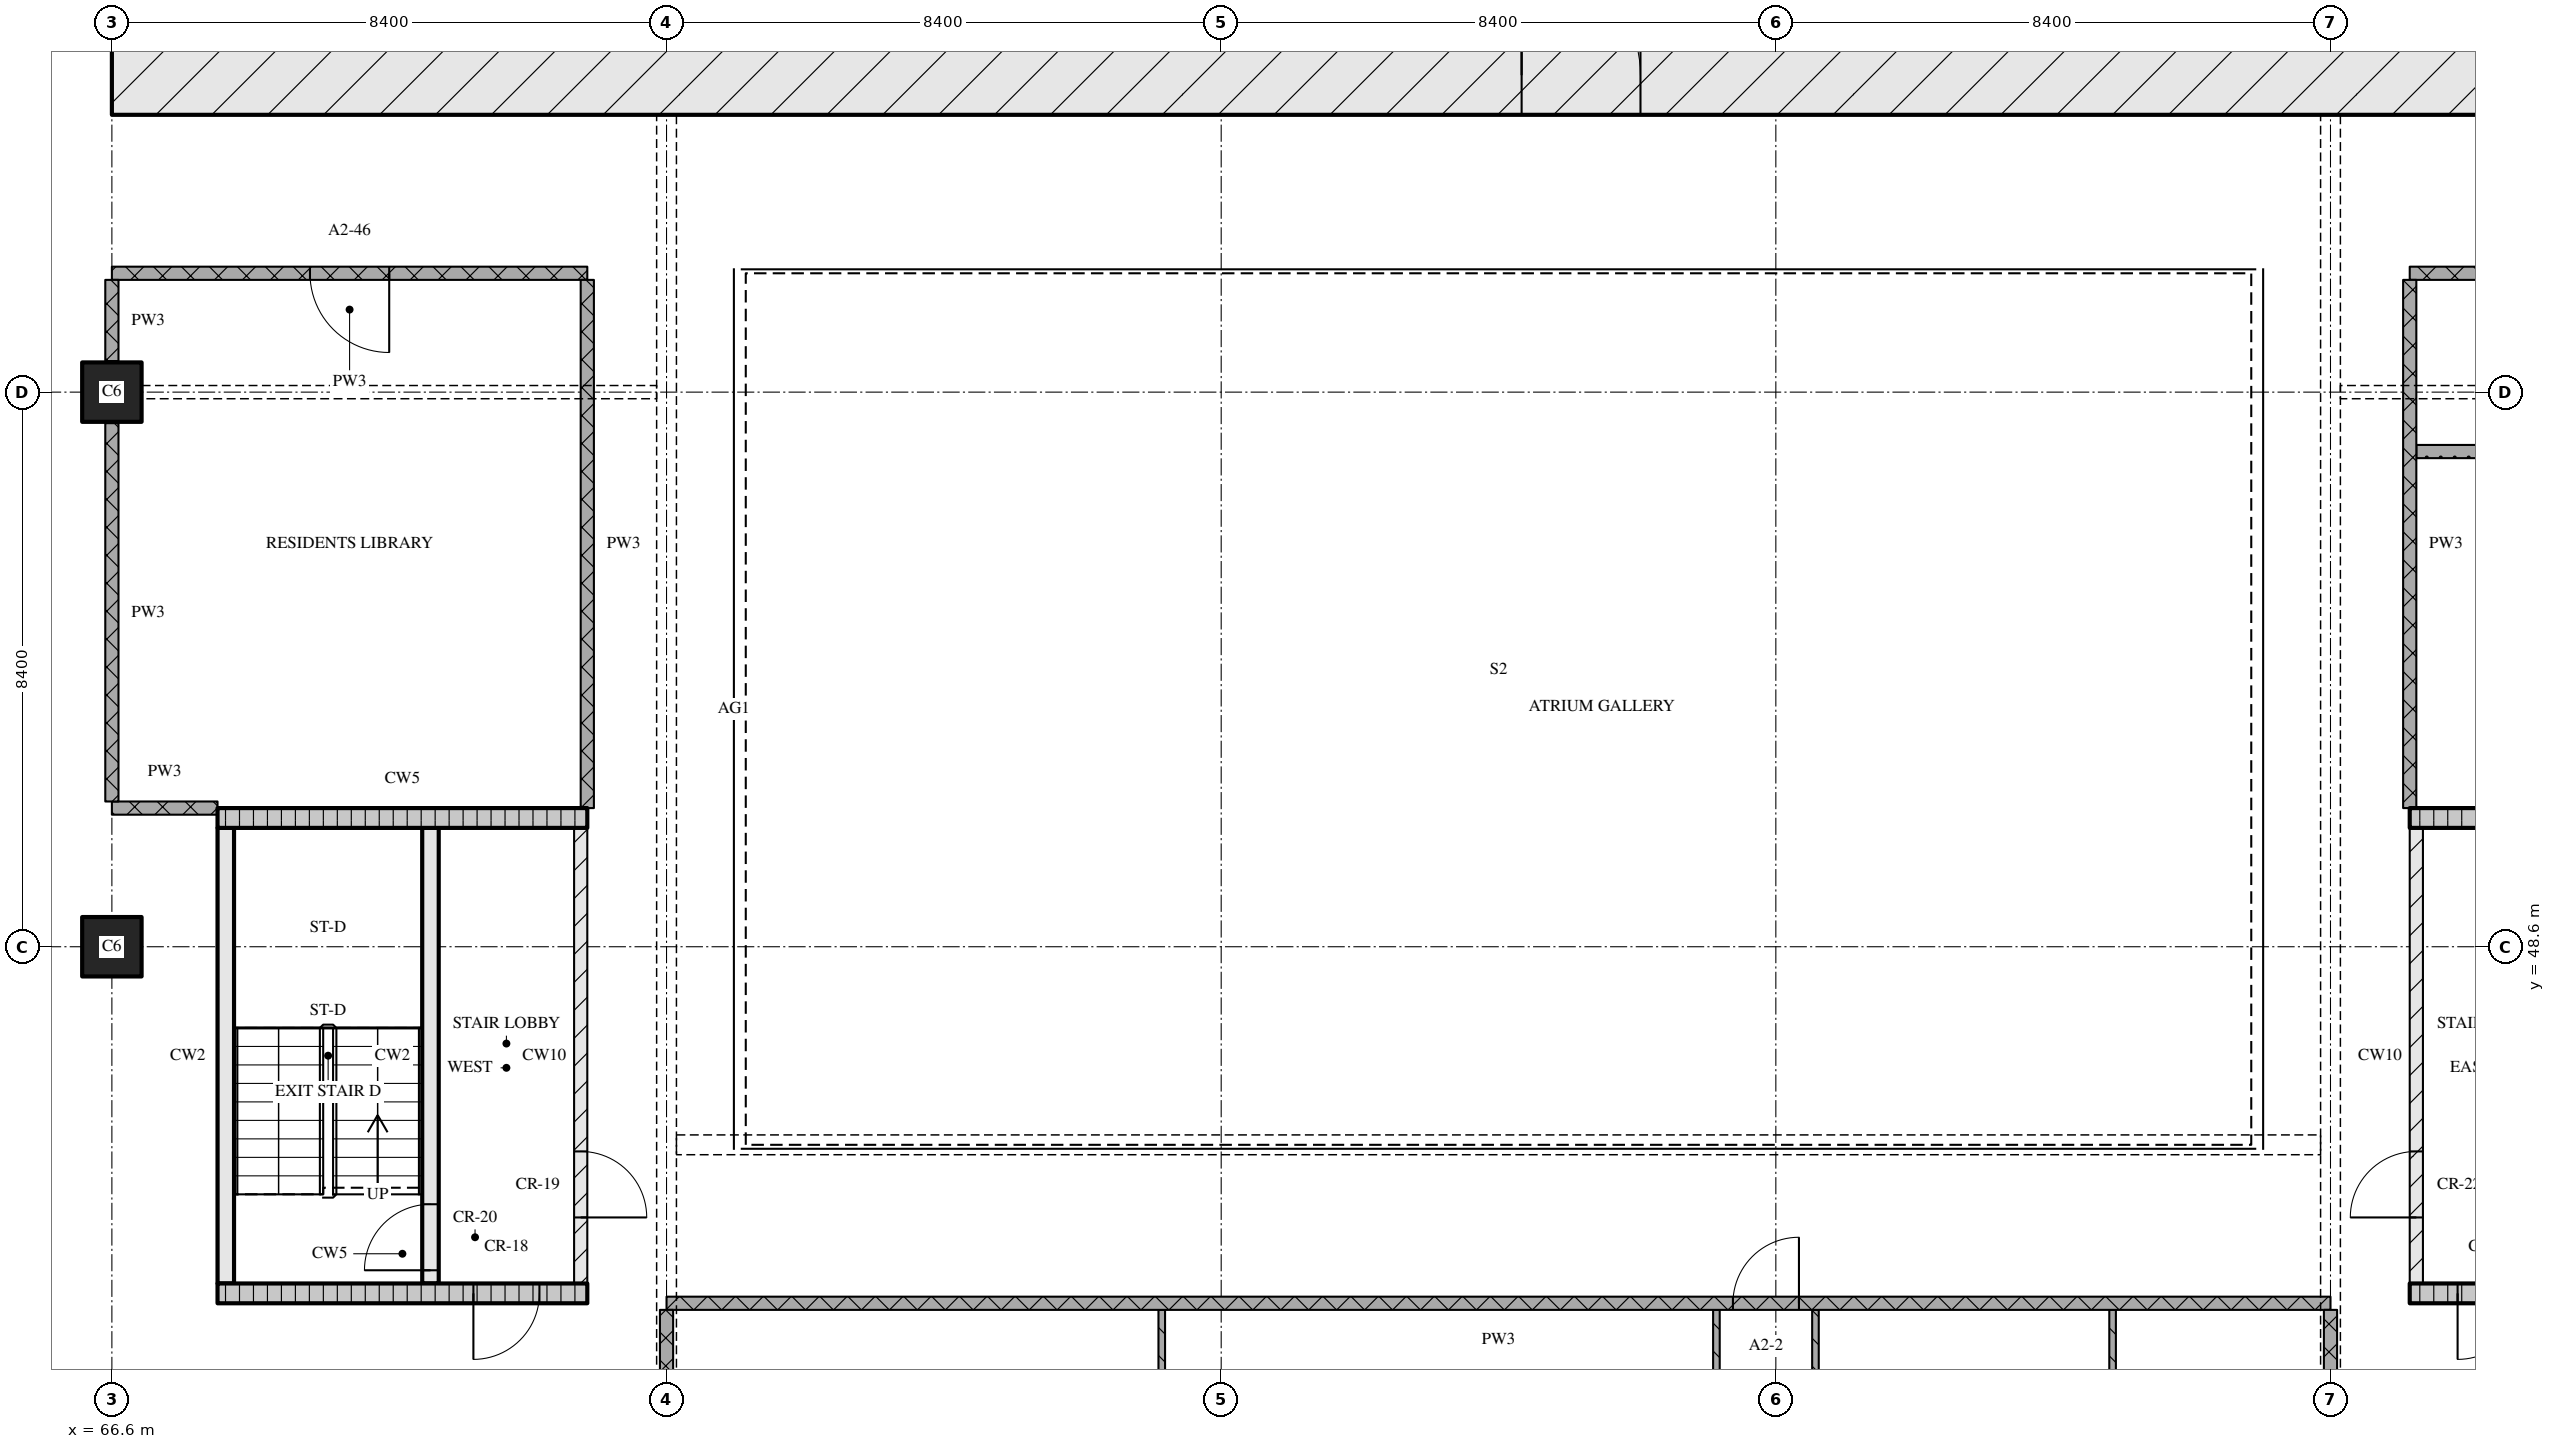
"""IFC4 building model, lengths in metres.
Left out: names, types, materials, properties, quantities, classifications, styles, units other than length and angle.
Written with IfcOpenShell. Run it as: python <this file> out.ifc"""

import sys

from ifc_helpers import new_model, si_unit, direction, frame, frame_2d, origin, origin_2d, place, context, subcontext, project, spatial, rectangle, extrude, element, fill, save


model = new_model("IFC4")
c1 = context("Model", 3, precision=1e-05, world=origin(), true_north=direction((0.0, 1.0)))
c2 = subcontext(c1, "Body", "Model", "MODEL_VIEW")
j1 = project(units=[si_unit("LENGTHUNIT", "METRE"), si_unit("PLANEANGLEUNIT", "RADIAN")], contexts=[c1])
p1 = place(None, origin())
s1 = spatial("IfcSite", under=j1, at=p1, CompositionType="ELEMENT")
p2 = place(p1, origin())
s2 = spatial("IfcBuilding", under=s1, at=p2, CompositionType="ELEMENT")
p3 = place(p2, frame((0.0, 0.0, 48.0)))
s3 = spatial("IfcBuildingStorey", under=s2, at=p3, CompositionType="ELEMENT", Elevation=48.0)
for number, where, z_axis, x_axis in (
    (1, (66.6, 48.6, 0.0), (0.0, 0.0, 1.0), (1.0, 0.0, 0.0)),
    (2, (66.6, 57.0, 0.0), (0.0, 0.0, 1.0), (1.0, 0.0, 0.0)),
):
    element("IfcColumn", number, at=place(p3, frame(where, z_axis=z_axis, x_axis=x_axis)), inside=s3, PredefinedType="COLUMN", context=c2, shape_type="SweptSolid", body=[
        extrude(rectangle(XDim=0.9, YDim=0.9, at=origin_2d()), origin(), (0.0, 0.0, 1.0), 3.6),
    ])
p4 = place(p3, frame((66.6, 61.8, 0.0), z_axis=(0.0, 0.0, 1.0), x_axis=(1.0, 0.0, 0.0)))
e3 = element("IfcWall", 3, at=p4, inside=s3, PredefinedType="SOLIDWALL", context=c2, shape_type="SweptSolid", body=[
    extrude(rectangle(XDim=42.0, YDim=1.2, at=frame_2d((21.0, 0.0))), origin(), (0.0, 0.0, 1.0), 3.32),
])
p5 = place(p4, frame((21.35, 0.0, 0.0)))
e4 = element("IfcOpeningElement", 4, at=p5, cuts=e3, PredefinedType="OPENING", context=c2, shape_type="SweptSolid", body=[
    extrude(rectangle(XDim=1.8, YDim=2.1, at=frame_2d((0.9, 1.05))), frame((0.0, 0.61, 0.0), z_axis=(0.0, -1.0, 0.0), x_axis=(1.0, 0.0, 0.0)), (0.0, 0.0, 1.0), 1.22),
])
p6 = place(p3, frame((68.2, 43.35, 0.0), z_axis=(0.0, 0.0, 1.0), x_axis=(1.0, 0.0, 0.0)))
e5 = element("IfcWall", 5, at=p6, inside=s3, PredefinedType="SOLIDWALL", context=c2, shape_type="SweptSolid", body=[
    extrude(rectangle(XDim=5.6, YDim=0.3, at=frame_2d((2.8, 0.0))), origin(), (0.0, 0.0, 1.0), 3.32),
])
p7 = place(p6, frame((3.875, 0.0, 0.0)))
e6 = element("IfcOpeningElement", 6, at=p7, cuts=e5, PredefinedType="OPENING", context=c2, shape_type="SweptSolid", body=[
    extrude(rectangle(XDim=1.0, YDim=2.1, at=frame_2d((0.5, 1.05))), frame((0.0, 0.16, 0.0), z_axis=(0.0, -1.0, 0.0), x_axis=(1.0, 0.0, 0.0)), (0.0, 0.0, 1.0), 0.32),
])
p8 = place(p3, frame((68.325, 43.5, 0.0), z_axis=(0.0, 0.0, 1.0), x_axis=(0.0, 1.0, 0.0)))
e7 = element("IfcWall", 7, at=p8, inside=s3, PredefinedType="SOLIDWALL", context=c2, shape_type="SweptSolid", body=[
    extrude(rectangle(XDim=6.9, YDim=0.25, at=frame_2d((3.45, 0.0))), origin(), (0.0, 0.0, 1.0), 3.32),
])
p9 = place(p3, frame((71.425, 43.5, 0.0), z_axis=(0.0, 0.0, 1.0), x_axis=(0.0, 1.0, 0.0)))
e8 = element("IfcWall", 8, at=p9, inside=s3, PredefinedType="SOLIDWALL", context=c2, shape_type="SweptSolid", body=[
    extrude(rectangle(XDim=6.9, YDim=0.25, at=frame_2d((3.45, 0.0))), origin(), (0.0, 0.0, 1.0), 3.32),
])
p10 = place(p9, frame((0.2, 0.0, 0.0)))
e9 = element("IfcOpeningElement", 9, at=p10, cuts=e8, PredefinedType="OPENING", context=c2, shape_type="SweptSolid", body=[
    extrude(rectangle(XDim=1.0, YDim=2.1, at=frame_2d((0.5, 1.05))), frame((0.0, 0.135, 0.0), z_axis=(0.0, -1.0, 0.0), x_axis=(1.0, 0.0, 0.0)), (0.0, 0.0, 1.0), 0.27),
])
p11 = place(p3, frame((73.7, 43.5, 0.0), z_axis=(0.0, 0.0, 1.0), x_axis=(0.0, 1.0, 0.0)))
e10 = element("IfcWall", 10, at=p11, inside=s3, PredefinedType="PARTITIONING", context=c2, shape_type="SweptSolid", body=[
    extrude(rectangle(XDim=6.9, YDim=0.2, at=frame_2d((3.45, 0.0))), origin(), (0.0, 0.0, 1.0), 3.32),
])
p12 = place(p11, frame((1.0, 0.0, 0.0)))
e11 = element("IfcOpeningElement", 11, at=p12, cuts=e10, PredefinedType="OPENING", context=c2, shape_type="SweptSolid", body=[
    extrude(rectangle(XDim=1.0, YDim=2.1, at=frame_2d((0.5, 1.05))), frame((0.0, 0.11, 0.0), z_axis=(0.0, -1.0, 0.0), x_axis=(1.0, 0.0, 0.0)), (0.0, 0.0, 1.0), 0.22),
])
p13 = place(p3, frame((68.2, 50.55, 0.0), z_axis=(0.0, 0.0, 1.0), x_axis=(1.0, 0.0, 0.0)))
e12 = element("IfcWall", 12, at=p13, inside=s3, PredefinedType="SOLIDWALL", context=c2, shape_type="SweptSolid", body=[
    extrude(rectangle(XDim=5.6, YDim=0.3, at=frame_2d((2.8, 0.0))), origin(), (0.0, 0.0, 1.0), 3.32),
])
p14 = place(p3, frame((101.4, 43.35, 0.0), z_axis=(0.0, 0.0, 1.0), x_axis=(1.0, 0.0, 0.0)))
e13 = element("IfcWall", 13, at=p14, inside=s3, PredefinedType="SOLIDWALL", context=c2, shape_type="SweptSolid", body=[
    extrude(rectangle(XDim=5.6, YDim=0.3, at=frame_2d((2.8, 0.0))), origin(), (0.0, 0.0, 1.0), 3.32),
])
p15 = place(p14, frame((0.725, 0.0, 0.0)))
e14 = element("IfcOpeningElement", 14, at=p15, cuts=e13, PredefinedType="OPENING", context=c2, shape_type="SweptSolid", body=[
    extrude(rectangle(XDim=1.0, YDim=2.1, at=frame_2d((0.5, 1.05))), frame((0.0, 0.16, 0.0), z_axis=(0.0, -1.0, 0.0), x_axis=(1.0, 0.0, 0.0)), (0.0, 0.0, 1.0), 0.32),
])
p16 = place(p3, frame((101.5, 43.5, 0.0), z_axis=(0.0, 0.0, 1.0), x_axis=(0.0, 1.0, 0.0)))
e15 = element("IfcWall", 15, at=p16, inside=s3, PredefinedType="PARTITIONING", context=c2, shape_type="SweptSolid", body=[
    extrude(rectangle(XDim=6.9, YDim=0.2, at=frame_2d((3.45, 0.0))), origin(), (0.0, 0.0, 1.0), 3.32),
])
p17 = place(p16, frame((1.0, 0.0, 0.0)))
e16 = element("IfcOpeningElement", 16, at=p17, cuts=e15, PredefinedType="OPENING", context=c2, shape_type="SweptSolid", body=[
    extrude(rectangle(XDim=1.0, YDim=2.1, at=frame_2d((0.5, 1.05))), frame((0.0, 0.11, 0.0), z_axis=(0.0, -1.0, 0.0), x_axis=(1.0, 0.0, 0.0)), (0.0, 0.0, 1.0), 0.22),
])
p18 = place(p3, frame((101.4, 50.55, 0.0), z_axis=(0.0, 0.0, 1.0), x_axis=(1.0, 0.0, 0.0)))
e17 = element("IfcWall", 17, at=p18, inside=s3, PredefinedType="SOLIDWALL", context=c2, shape_type="SweptSolid", body=[
    extrude(rectangle(XDim=5.6, YDim=0.3, at=frame_2d((2.8, 0.0))), origin(), (0.0, 0.0, 1.0), 3.32),
])
p19 = place(p3, frame((100.2, 43.2, 0.0), z_axis=(0.0, 0.0, 1.0), x_axis=(-1.0, 0.0, 0.0)))
e18 = element("IfcWall", 18, at=p19, inside=s3, PredefinedType="PARTITIONING", context=c2, shape_type="SweptSolid", body=[
    extrude(rectangle(XDim=25.2, YDim=0.2, at=frame_2d((12.6, 0.0))), origin(), (0.0, 0.0, 1.0), 3.32),
])
p20 = place(p19, frame((8.05, 0.0, 0.0)))
e19 = element("IfcOpeningElement", 19, at=p20, cuts=e18, PredefinedType="OPENING", context=c2, shape_type="SweptSolid", body=[
    extrude(rectangle(XDim=1.0, YDim=2.1, at=frame_2d((0.5, 1.05))), frame((0.0, 0.11, 0.0), z_axis=(0.0, -1.0, 0.0), x_axis=(1.0, 0.0, 0.0)), (0.0, 0.0, 1.0), 0.22),
])
p21 = place(p3, frame((66.6, 50.7, 0.0), z_axis=(0.0, 0.0, 1.0), x_axis=(1.0, 0.0, 0.0)))
e20 = element("IfcWall", 20, at=p21, inside=s3, PredefinedType="PARTITIONING", context=c2, shape_type="SweptSolid", body=[
    extrude(rectangle(XDim=1.6, YDim=0.2, at=frame_2d((0.8, 0.0))), origin(), (0.0, 0.0, 1.0), 3.32),
])
p22 = place(p3, frame((101.5, 56.1, 0.0), z_axis=(0.0, 0.0, 1.0), x_axis=(1.0, 0.0, 0.0)))
e21 = element("IfcWall", 21, at=p22, inside=s3, PredefinedType="PARTITIONING", context=c2, shape_type="SweptSolid", body=[
    extrude(rectangle(XDim=7.0, YDim=0.2, at=frame_2d((3.5, 0.0))), origin(), (0.0, 0.0, 1.0), 3.32),
])
p23 = place(p3, frame((73.8, 58.8, 0.0), z_axis=(0.0, 0.0, 1.0), x_axis=(-1.0, 0.0, 0.0)))
e22 = element("IfcWall", 22, at=p23, inside=s3, PredefinedType="PARTITIONING", context=c2, shape_type="SweptSolid", body=[
    extrude(rectangle(XDim=7.2, YDim=0.2, at=frame_2d((3.6, 0.0))), origin(), (0.0, 0.0, 1.0), 3.32),
])
p24 = place(p23, frame((3.0, 0.0, 0.0)))
e23 = element("IfcOpeningElement", 23, at=p24, cuts=e22, PredefinedType="OPENING", context=c2, shape_type="SweptSolid", body=[
    extrude(rectangle(XDim=1.2, YDim=2.1, at=frame_2d((0.6, 1.05))), frame((0.0, 0.11, 0.0), z_axis=(0.0, -1.0, 0.0), x_axis=(1.0, 0.0, 0.0)), (0.0, 0.0, 1.0), 0.22),
])
p25 = place(p3, frame((101.4, 58.8, 0.0), z_axis=(0.0, 0.0, 1.0), x_axis=(1.0, 0.0, 0.0)))
e24 = element("IfcWall", 24, at=p25, inside=s3, PredefinedType="PARTITIONING", context=c2, shape_type="SweptSolid", body=[
    extrude(rectangle(XDim=7.2, YDim=0.2, at=frame_2d((3.6, 0.0))), origin(), (0.0, 0.0, 1.0), 3.32),
])
p26 = place(p3, frame((66.6, 56.53, 0.0), z_axis=(0.0, 0.0, 1.0), x_axis=(0.0, -1.0, 0.0)))
e25 = element("IfcWall", 25, at=p26, inside=s3, PredefinedType="PARTITIONING", context=c2, shape_type="SweptSolid", body=[
    extrude(rectangle(XDim=5.73, YDim=0.2, at=frame_2d((2.865, 0.0))), origin(), (0.0, 0.0, 1.0), 3.32),
])
p27 = place(p3, frame((66.6, 58.7, 0.0), z_axis=(0.0, 0.0, 1.0), x_axis=(0.0, -1.0, 0.0)))
e26 = element("IfcWall", 26, at=p27, inside=s3, PredefinedType="PARTITIONING", context=c2, shape_type="SweptSolid", body=[
    extrude(rectangle(XDim=1.23, YDim=0.2, at=frame_2d((0.615, 0.0))), origin(), (0.0, 0.0, 1.0), 3.32),
])
p28 = place(p3, frame((73.8, 58.7, 0.0), z_axis=(0.0, 0.0, 1.0), x_axis=(0.0, -1.0, 0.0)))
e27 = element("IfcWall", 27, at=p28, inside=s3, PredefinedType="PARTITIONING", context=c2, shape_type="SweptSolid", body=[
    extrude(rectangle(XDim=8.0, YDim=0.2, at=frame_2d((4.0, 0.0))), origin(), (0.0, 0.0, 1.0), 3.32),
])
p29 = place(p3, frame((75.0, 43.1, 0.0), z_axis=(0.0, 0.0, 1.0), x_axis=(0.0, -1.0, 0.0)))
e28 = element("IfcWall", 28, at=p29, inside=s3, PredefinedType="PARTITIONING", context=c2, shape_type="SweptSolid", body=[
    extrude(rectangle(XDim=2.2, YDim=0.2, at=frame_2d((1.1, 0.0))), origin(), (0.0, 0.0, 1.0), 2.43),
])
p30 = place(p3, frame((82.5, 43.1, 0.0), z_axis=(0.0, 0.0, 1.0), x_axis=(0.0, -1.0, 0.0)))
e29 = element("IfcWall", 29, at=p30, inside=s3, PredefinedType="PARTITIONING", context=c2, shape_type="SweptSolid", body=[
    extrude(rectangle(XDim=4.95, YDim=0.1, at=frame_2d((2.475, 0.0))), origin(), (0.0, 0.0, 1.0), 3.32),
])
p31 = place(p3, frame((90.9, 38.15, 0.0), z_axis=(0.0, 0.0, 1.0), x_axis=(0.0, 1.0, 0.0)))
e30 = element("IfcWall", 30, at=p31, inside=s3, PredefinedType="PARTITIONING", context=c2, shape_type="SweptSolid", body=[
    extrude(rectangle(XDim=4.95, YDim=0.1, at=frame_2d((2.475, 0.0))), origin(), (0.0, 0.0, 1.0), 3.32),
])
p32 = place(p31, frame((2.65, 0.0, 0.0)))
e31 = element("IfcOpeningElement", 31, at=p32, cuts=e30, PredefinedType="OPENING", context=c2, shape_type="SweptSolid", body=[
    extrude(rectangle(XDim=0.9, YDim=2.1, at=frame_2d((0.45, 1.05))), frame((0.0, 0.06, 0.0), z_axis=(0.0, -1.0, 0.0), x_axis=(1.0, 0.0, 0.0)), (0.0, 0.0, 1.0), 0.12),
])
p33 = place(p3, frame((92.4, 43.1, 0.0), z_axis=(0.0, 0.0, 1.0), x_axis=(0.0, -1.0, 0.0)))
e32 = element("IfcWall", 32, at=p33, inside=s3, PredefinedType="PARTITIONING", context=c2, shape_type="SweptSolid", body=[
    extrude(rectangle(XDim=4.95, YDim=0.1, at=frame_2d((2.475, 0.0))), origin(), (0.0, 0.0, 1.0), 3.32),
])
p34 = place(p33, frame((1.6, 0.0, 0.0)))
e33 = element("IfcOpeningElement", 33, at=p34, cuts=e32, PredefinedType="OPENING", context=c2, shape_type="SweptSolid", body=[
    extrude(rectangle(XDim=0.8, YDim=2.1, at=frame_2d((0.4, 1.05))), frame((0.0, 0.06, 0.0), z_axis=(0.0, -1.0, 0.0), x_axis=(1.0, 0.0, 0.0)), (0.0, 0.0, 1.0), 0.12),
])
p35 = place(p3, frame((96.9, 43.1, 0.0), z_axis=(0.0, 0.0, 1.0), x_axis=(0.0, -1.0, 0.0)))
e34 = element("IfcWall", 34, at=p35, inside=s3, PredefinedType="PARTITIONING", context=c2, shape_type="SweptSolid", body=[
    extrude(rectangle(XDim=4.95, YDim=0.1, at=frame_2d((2.475, 0.0))), origin(), (0.0, 0.0, 1.0), 3.32),
])
p36 = place(p3, frame((100.2, 43.1, 0.0), z_axis=(0.0, 0.0, 1.0), x_axis=(0.0, -1.0, 0.0)))
e35 = element("IfcWall", 35, at=p36, inside=s3, PredefinedType="PARTITIONING", context=c2, shape_type="SweptSolid", body=[
    extrude(rectangle(XDim=2.2, YDim=0.2, at=frame_2d((1.1, 0.0))), origin(), (0.0, 0.0, 1.0), 2.43),
])
p37 = place(p3, frame((101.4, 58.7, 0.0), z_axis=(0.0, 0.0, 1.0), x_axis=(0.0, -1.0, 0.0)))
e36 = element("IfcWall", 36, at=p37, inside=s3, PredefinedType="PARTITIONING", context=c2, shape_type="SweptSolid", body=[
    extrude(rectangle(XDim=8.0, YDim=0.2, at=frame_2d((4.0, 0.0))), origin(), (0.0, 0.0, 1.0), 3.32),
])
p38 = place(p5, origin())
e37 = element("IfcDoor", 37, at=p38, inside=s3, OperationType="DOUBLE_DOOR_SINGLE_SWING", PredefinedType="DOOR", context=c2, shape_type="SweptSolid", body=[
    extrude(rectangle(XDim=1.8, YDim=2.1, at=frame_2d((0.9, 1.05))), frame((0.0, 0.025, 0.0), z_axis=(0.0, -1.0, 0.0), x_axis=(1.0, 0.0, 0.0)), (0.0, 0.0, 1.0), 0.05),
])
fill(e4, e37)
p39 = place(p7, origin())
e38 = element("IfcDoor", 38, at=p39, inside=s3, OperationType="SINGLE_SWING_RIGHT", PredefinedType="DOOR", context=c2, shape_type="SweptSolid", body=[
    extrude(rectangle(XDim=1.0, YDim=2.1, at=frame_2d((0.5, 1.05))), frame((0.0, 0.025, 0.0), z_axis=(0.0, -1.0, 0.0), x_axis=(1.0, 0.0, 0.0)), (0.0, 0.0, 1.0), 0.05),
])
fill(e6, e38)
p40 = place(p10, origin())
e39 = element("IfcDoor", 39, at=p40, inside=s3, OperationType="SINGLE_SWING_LEFT", PredefinedType="DOOR", context=c2, shape_type="SweptSolid", body=[
    extrude(rectangle(XDim=1.0, YDim=2.1, at=frame_2d((0.5, 1.05))), frame((0.0, 0.025, 0.0), z_axis=(0.0, -1.0, 0.0), x_axis=(1.0, 0.0, 0.0)), (0.0, 0.0, 1.0), 0.05),
])
fill(e9, e39)
p41 = place(p12, origin())
e40 = element("IfcDoor", 40, at=p41, inside=s3, OperationType="SINGLE_SWING_RIGHT", PredefinedType="DOOR", context=c2, shape_type="SweptSolid", body=[
    extrude(rectangle(XDim=1.0, YDim=2.1, at=frame_2d((0.5, 1.05))), frame((0.0, 0.025, 0.0), z_axis=(0.0, -1.0, 0.0), x_axis=(1.0, 0.0, 0.0)), (0.0, 0.0, 1.0), 0.05),
])
fill(e11, e40)
p42 = place(p15, origin())
e41 = element("IfcDoor", 41, at=p42, inside=s3, OperationType="SINGLE_SWING_RIGHT", PredefinedType="DOOR", context=c2, shape_type="SweptSolid", body=[
    extrude(rectangle(XDim=1.0, YDim=2.1, at=frame_2d((0.5, 1.05))), frame((0.0, 0.025, 0.0), z_axis=(0.0, -1.0, 0.0), x_axis=(1.0, 0.0, 0.0)), (0.0, 0.0, 1.0), 0.05),
])
fill(e14, e41)
p43 = place(p17, origin())
e42 = element("IfcDoor", 42, at=p43, inside=s3, OperationType="SINGLE_SWING_LEFT", PredefinedType="DOOR", context=c2, shape_type="SweptSolid", body=[
    extrude(rectangle(XDim=1.0, YDim=2.1, at=frame_2d((0.5, 1.05))), frame((0.0, 0.025, 0.0), z_axis=(0.0, -1.0, 0.0), x_axis=(1.0, 0.0, 0.0)), (0.0, 0.0, 1.0), 0.05),
])
fill(e16, e42)
p44 = place(p20, origin())
e43 = element("IfcDoor", 43, at=p44, inside=s3, OperationType="SINGLE_SWING_RIGHT", PredefinedType="DOOR", context=c2, shape_type="SweptSolid", body=[
    extrude(rectangle(XDim=1.0, YDim=2.1, at=frame_2d((0.5, 1.05))), frame((0.0, 0.025, 0.0), z_axis=(0.0, -1.0, 0.0), x_axis=(1.0, 0.0, 0.0)), (0.0, 0.0, 1.0), 0.05),
])
fill(e19, e43)
p45 = place(p24, origin())
e44 = element("IfcDoor", 44, at=p45, inside=s3, OperationType="SINGLE_SWING_LEFT", PredefinedType="DOOR", context=c2, shape_type="SweptSolid", body=[
    extrude(rectangle(XDim=1.2, YDim=2.1, at=frame_2d((0.6, 1.05))), frame((0.0, 0.025, 0.0), z_axis=(0.0, -1.0, 0.0), x_axis=(1.0, 0.0, 0.0)), (0.0, 0.0, 1.0), 0.05),
])
fill(e23, e44)
save(model, sys.argv[1])
